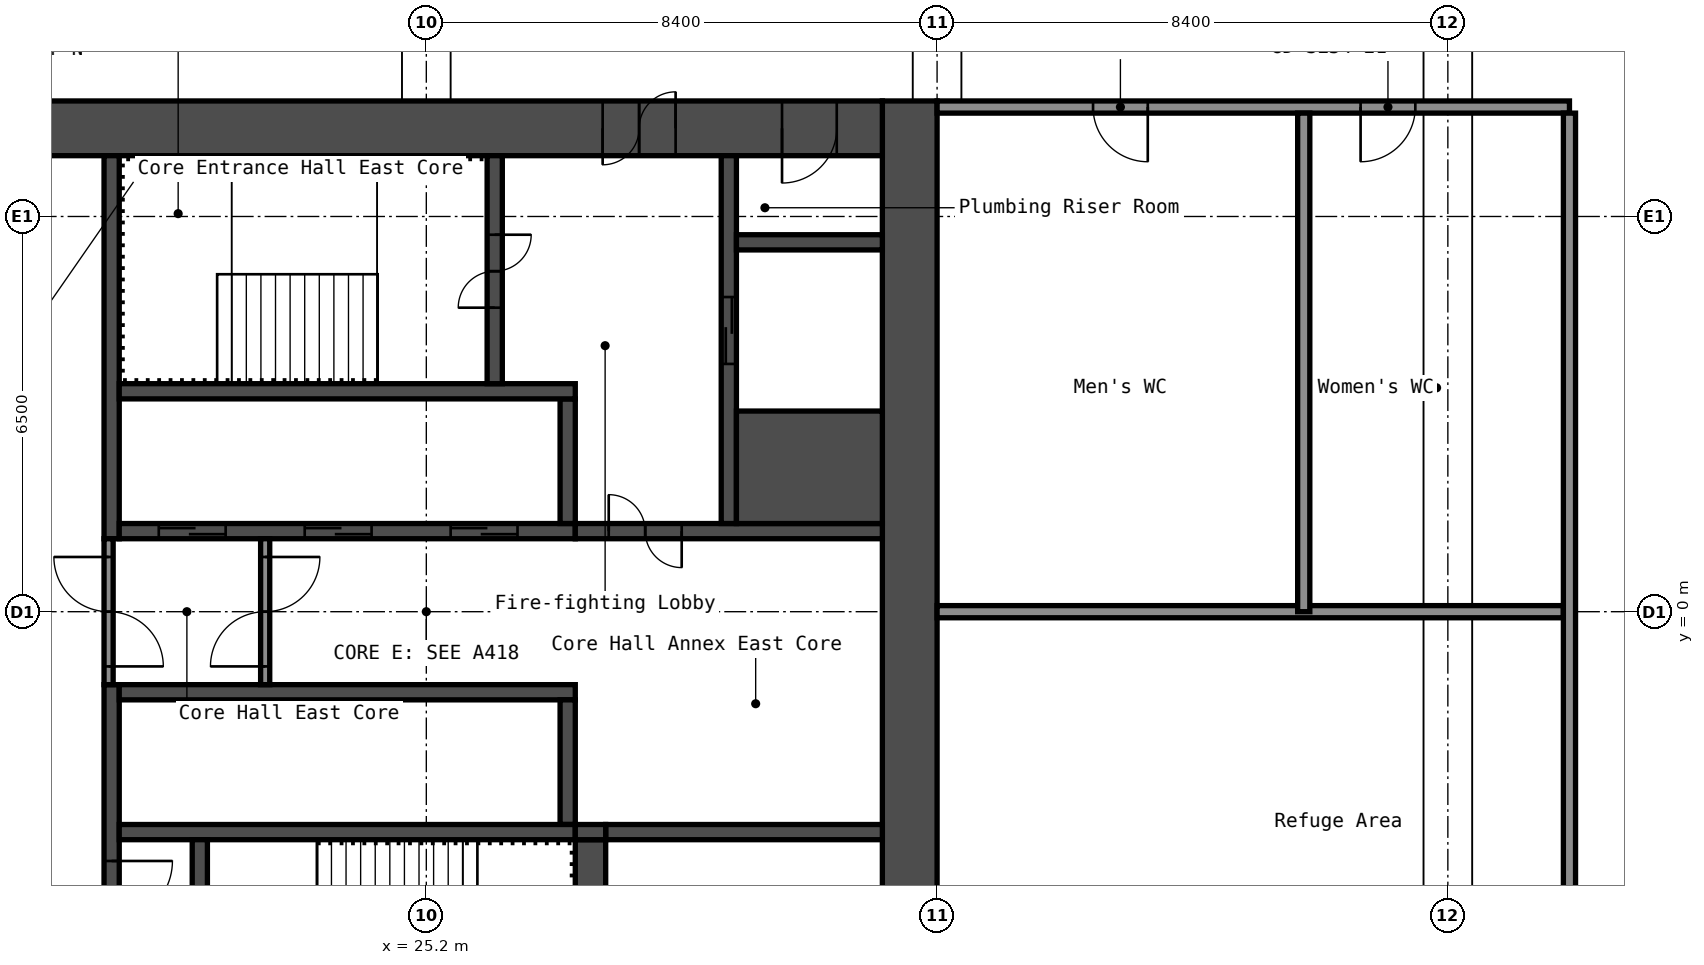
"""IFC4 building model, lengths in metres.
Left out: names, types, materials, properties, quantities, classifications, styles, units other than length and angle.
Written with IfcOpenShell. Run it as: python <this file> out.ifc"""

import sys

from ifc_helpers import new_model, si_unit, direction, frame, frame_2d, origin, place, context, subcontext, project, spatial, rectangle, extrude, element, fill, save


model = new_model("IFC4")
c1 = context("Model", 3, precision=1e-05, world=origin(), true_north=direction((0.0, 1.0)))
c2 = subcontext(c1, "Body", "Model", "MODEL_VIEW")
j1 = project(units=[si_unit("LENGTHUNIT", "METRE"), si_unit("PLANEANGLEUNIT", "RADIAN")], contexts=[c1])
p1 = place(None, origin())
s1 = spatial("IfcSite", under=j1, at=p1, CompositionType="ELEMENT")
p2 = place(p1, origin())
s2 = spatial("IfcBuilding", under=s1, at=p2, CompositionType="ELEMENT")
p3 = place(p2, frame((0.0, 0.0, 120.2)))
s3 = spatial("IfcBuildingStorey", under=s2, at=p3, CompositionType="ELEMENT", Elevation=120.2)
p4 = place(p3, frame((33.15, -8.4, 0.0), z_axis=(0.0, 0.0, 1.0), x_axis=(0.0, 1.0, 0.0)))
e1 = element("IfcWall", 1, at=p4, inside=s3, PredefinedType="SHEAR", context=c2, shape_type="SweptSolid", body=[
    extrude(rectangle(XDim=16.8, YDim=0.9, at=frame_2d((8.4, 0.0))), origin(), (0.0, 0.0, 1.0), 4.1),
])
p5 = place(p3, frame((17.7, 7.95, 0.0), z_axis=(0.0, 0.0, 1.0), x_axis=(1.0, 0.0, 0.0)))
e2 = element("IfcWall", 2, at=p5, inside=s3, PredefinedType="SHEAR", context=c2, shape_type="SweptSolid", body=[
    extrude(rectangle(XDim=15.0, YDim=0.9, at=frame_2d((7.5, 0.0))), origin(), (0.0, 0.0, 1.0), 4.1),
])
p6 = place(p5, frame((10.4, 0.0, 0.0)))
e3 = element("IfcOpeningElement", 3, at=p6, cuts=e2, PredefinedType="OPENING", context=c2, shape_type="SweptSolid", body=[
    extrude(rectangle(XDim=1.2, YDim=2.1, at=frame_2d((0.6, 1.05))), frame((0.0, 0.46, 0.0), z_axis=(0.0, -1.0, 0.0), x_axis=(1.0, 0.0, 0.0)), (0.0, 0.0, 1.0), 0.92),
])
p7 = place(p5, frame((13.35, 0.0, 0.0)))
e4 = element("IfcOpeningElement", 4, at=p7, cuts=e2, PredefinedType="OPENING", context=c2, shape_type="SweptSolid", body=[
    extrude(rectangle(XDim=0.9, YDim=2.1, at=frame_2d((0.45, 1.05))), frame((0.0, 0.46, 0.0), z_axis=(0.0, -1.0, 0.0), x_axis=(1.0, 0.0, 0.0)), (0.0, 0.0, 1.0), 0.92),
])
p8 = place(p3, frame((20.025, 1.2, 0.0), z_axis=(0.0, 0.0, 1.0), x_axis=(0.0, 1.0, 0.0)))
e5 = element("IfcWall", 5, at=p8, inside=s3, PredefinedType="SHEAR", context=c2, shape_type="SweptSolid", body=[
    extrude(rectangle(XDim=6.3, YDim=0.25, at=frame_2d((3.15, 0.0))), origin(), (0.0, 0.0, 1.0), 4.1),
])
p9 = place(p3, frame((20.025, -7.5, 0.0), z_axis=(0.0, 0.0, 1.0), x_axis=(0.0, 1.0, 0.0)))
e6 = element("IfcWall", 6, at=p9, inside=s3, PredefinedType="SHEAR", context=c2, shape_type="SweptSolid", body=[
    extrude(rectangle(XDim=6.3, YDim=0.25, at=frame_2d((3.15, 0.0))), origin(), (0.0, 0.0, 1.0), 4.1),
])
p10 = place(p9, frame((2.4, 0.0, 0.0)))
e7 = element("IfcOpeningElement", 7, at=p10, cuts=e6, PredefinedType="OPENING", context=c2, shape_type="SweptSolid", body=[
    extrude(rectangle(XDim=1.0, YDim=2.1, at=frame_2d((0.5, 1.05))), frame((0.0, 0.135, 0.0), z_axis=(0.0, -1.0, 0.0), x_axis=(1.0, 0.0, 0.0)), (0.0, 0.0, 1.0), 0.27),
])
p11 = place(p3, frame((20.15, 1.325, 0.0), z_axis=(0.0, 0.0, 1.0), x_axis=(1.0, 0.0, 0.0)))
e8 = element("IfcWall", 8, at=p11, inside=s3, PredefinedType="SHEAR", context=c2, shape_type="SweptSolid", body=[
    extrude(rectangle(XDim=7.5, YDim=0.25, at=frame_2d((3.75, 0.0))), origin(), (0.0, 0.0, 1.0), 4.1),
])
p12 = place(p11, frame((0.65, 0.0, 0.0)))
e9 = element("IfcOpeningElement", 9, at=p12, cuts=e8, PredefinedType="OPENING", context=c2, shape_type="SweptSolid", body=[
    extrude(rectangle(XDim=1.1, YDim=2.1, at=frame_2d((0.55, 1.05))), frame((0.0, 0.135, 0.0), z_axis=(0.0, -1.0, 0.0), x_axis=(1.0, 0.0, 0.0)), (0.0, 0.0, 1.0), 0.27),
])
p13 = place(p11, frame((3.05, 0.0, 0.0)))
e10 = element("IfcOpeningElement", 10, at=p13, cuts=e8, PredefinedType="OPENING", context=c2, shape_type="SweptSolid", body=[
    extrude(rectangle(XDim=1.1, YDim=2.1, at=frame_2d((0.55, 1.05))), frame((0.0, 0.135, 0.0), z_axis=(0.0, -1.0, 0.0), x_axis=(1.0, 0.0, 0.0)), (0.0, 0.0, 1.0), 0.27),
])
p14 = place(p11, frame((5.45, 0.0, 0.0)))
e11 = element("IfcOpeningElement", 11, at=p14, cuts=e8, PredefinedType="OPENING", context=c2, shape_type="SweptSolid", body=[
    extrude(rectangle(XDim=1.1, YDim=2.1, at=frame_2d((0.55, 1.05))), frame((0.0, 0.135, 0.0), z_axis=(0.0, -1.0, 0.0), x_axis=(1.0, 0.0, 0.0)), (0.0, 0.0, 1.0), 0.27),
])
p15 = place(p3, frame((27.525, 1.45, 0.0), z_axis=(0.0, 0.0, 1.0), x_axis=(0.0, 1.0, 0.0)))
e12 = element("IfcWall", 12, at=p15, inside=s3, PredefinedType="SHEAR", context=c2, shape_type="SweptSolid", body=[
    extrude(rectangle(XDim=2.05, YDim=0.25, at=frame_2d((1.025, 0.0))), origin(), (0.0, 0.0, 1.0), 4.1),
])
p16 = place(p3, frame((20.15, 3.625, 0.0), z_axis=(0.0, 0.0, 1.0), x_axis=(1.0, 0.0, 0.0)))
e13 = element("IfcWall", 13, at=p16, inside=s3, PredefinedType="SHEAR", context=c2, shape_type="SweptSolid", body=[
    extrude(rectangle(XDim=7.5, YDim=0.25, at=frame_2d((3.75, 0.0))), origin(), (0.0, 0.0, 1.0), 4.1),
])
p17 = place(p3, frame((26.325, 3.75, 0.0), z_axis=(0.0, 0.0, 1.0), x_axis=(0.0, 1.0, 0.0)))
e14 = element("IfcWall", 14, at=p17, inside=s3, PredefinedType="SHEAR", context=c2, shape_type="SweptSolid", body=[
    extrude(rectangle(XDim=3.75, YDim=0.25, at=frame_2d((1.875, 0.0))), origin(), (0.0, 0.0, 1.0), 4.1),
])
p18 = place(p17, frame((1.25, 0.0, 0.0)))
e15 = element("IfcOpeningElement", 15, at=p18, cuts=e14, PredefinedType="OPENING", context=c2, shape_type="SweptSolid", body=[
    extrude(rectangle(XDim=1.2, YDim=2.1, at=frame_2d((0.6, 1.05))), frame((0.0, 0.135, 0.0), z_axis=(0.0, -1.0, 0.0), x_axis=(1.0, 0.0, 0.0)), (0.0, 0.0, 1.0), 0.27),
])
p19 = place(p3, frame((27.65, 1.325, 0.0), z_axis=(0.0, 0.0, 1.0), x_axis=(1.0, 0.0, 0.0)))
e16 = element("IfcWall", 16, at=p19, inside=s3, PredefinedType="SHEAR", context=c2, shape_type="SweptSolid", body=[
    extrude(rectangle(XDim=5.05, YDim=0.25, at=frame_2d((2.525, 0.0))), origin(), (0.0, 0.0, 1.0), 4.1),
])
p20 = place(p19, frame((0.55, 0.0, 0.0)))
e17 = element("IfcOpeningElement", 17, at=p20, cuts=e16, PredefinedType="OPENING", context=c2, shape_type="SweptSolid", body=[
    extrude(rectangle(XDim=1.2, YDim=2.1, at=frame_2d((0.6, 1.05))), frame((0.0, 0.135, 0.0), z_axis=(0.0, -1.0, 0.0), x_axis=(1.0, 0.0, 0.0)), (0.0, 0.0, 1.0), 0.27),
])
p21 = place(p3, frame((30.175, 1.45, 0.0), z_axis=(0.0, 0.0, 1.0), x_axis=(0.0, 1.0, 0.0)))
e18 = element("IfcWall", 18, at=p21, inside=s3, PredefinedType="SHEAR", context=c2, shape_type="SweptSolid", body=[
    extrude(rectangle(XDim=6.05, YDim=0.25, at=frame_2d((3.025, 0.0))), origin(), (0.0, 0.0, 1.0), 4.1),
])
p22 = place(p21, frame((2.625, 0.0, 0.0)))
e19 = element("IfcOpeningElement", 19, at=p22, cuts=e18, PredefinedType="OPENING", context=c2, shape_type="SweptSolid", body=[
    extrude(rectangle(XDim=1.1, YDim=2.1, at=frame_2d((0.55, 1.05))), frame((0.0, 0.135, 0.0), z_axis=(0.0, -1.0, 0.0), x_axis=(1.0, 0.0, 0.0)), (0.0, 0.0, 1.0), 0.27),
])
p23 = place(p3, frame((30.3, 2.375, 0.0), z_axis=(0.0, 0.0, 1.0), x_axis=(1.0, 0.0, 0.0)))
e20 = element("IfcWall", 20, at=p23, inside=s3, PredefinedType="SHEAR", context=c2, shape_type="SweptSolid", body=[
    extrude(rectangle(XDim=2.4, YDim=1.85, at=frame_2d((1.2, 0.0))), origin(), (0.0, 0.0, 1.0), 4.1),
])
p24 = place(p3, frame((30.3, 6.075, 0.0), z_axis=(0.0, 0.0, 1.0), x_axis=(1.0, 0.0, 0.0)))
e21 = element("IfcWall", 21, at=p24, inside=s3, PredefinedType="SHEAR", context=c2, shape_type="SweptSolid", body=[
    extrude(rectangle(XDim=2.4, YDim=0.25, at=frame_2d((1.2, 0.0))), origin(), (0.0, 0.0, 1.0), 4.1),
])
p25 = place(p3, frame((20.15, -1.325, 0.0), z_axis=(0.0, 0.0, 1.0), x_axis=(1.0, 0.0, 0.0)))
e22 = element("IfcWall", 22, at=p25, inside=s3, PredefinedType="SHEAR", context=c2, shape_type="SweptSolid", body=[
    extrude(rectangle(XDim=7.5, YDim=0.25, at=frame_2d((3.75, 0.0))), origin(), (0.0, 0.0, 1.0), 4.1),
])
p26 = place(p3, frame((27.525, -3.5, 0.0), z_axis=(0.0, 0.0, 1.0), x_axis=(0.0, 1.0, 0.0)))
e23 = element("IfcWall", 23, at=p26, inside=s3, PredefinedType="SHEAR", context=c2, shape_type="SweptSolid", body=[
    extrude(rectangle(XDim=2.05, YDim=0.25, at=frame_2d((1.025, 0.0))), origin(), (0.0, 0.0, 1.0), 4.1),
])
p27 = place(p3, frame((20.15, -3.625, 0.0), z_axis=(0.0, 0.0, 1.0), x_axis=(1.0, 0.0, 0.0)))
e24 = element("IfcWall", 24, at=p27, inside=s3, PredefinedType="SHEAR", context=c2, shape_type="SweptSolid", body=[
    extrude(rectangle(XDim=7.5, YDim=0.25, at=frame_2d((3.75, 0.0))), origin(), (0.0, 0.0, 1.0), 4.1),
])
p28 = place(p3, frame((21.475, -7.5, 0.0), z_axis=(0.0, 0.0, 1.0), x_axis=(0.0, 1.0, 0.0)))
e25 = element("IfcWall", 25, at=p28, inside=s3, PredefinedType="SHEAR", context=c2, shape_type="SweptSolid", body=[
    extrude(rectangle(XDim=3.75, YDim=0.25, at=frame_2d((1.875, 0.0))), origin(), (0.0, 0.0, 1.0), 4.1),
])
p29 = place(p28, frame((1.3, 0.0, 0.0)))
e26 = element("IfcOpeningElement", 26, at=p29, cuts=e25, PredefinedType="OPENING", context=c2, shape_type="SweptSolid", body=[
    extrude(rectangle(XDim=1.2, YDim=2.1, at=frame_2d((0.6, 1.05))), frame((0.0, 0.135, 0.0), z_axis=(0.0, -1.0, 0.0), x_axis=(1.0, 0.0, 0.0)), (0.0, 0.0, 1.0), 0.27),
])
p30 = place(p3, frame((27.9, -7.5, 0.0), z_axis=(0.0, 0.0, 1.0), x_axis=(0.0, 1.0, 0.0)))
e27 = element("IfcWall", 27, at=p30, inside=s3, PredefinedType="SHEAR", context=c2, shape_type="SweptSolid", body=[
    extrude(rectangle(XDim=3.75, YDim=0.5, at=frame_2d((1.875, 0.0))), origin(), (0.0, 0.0, 1.0), 4.1),
])
p31 = place(p3, frame((28.15, -3.625, 0.0), z_axis=(0.0, 0.0, 1.0), x_axis=(1.0, 0.0, 0.0)))
e28 = element("IfcWall", 28, at=p31, inside=s3, PredefinedType="SHEAR", context=c2, shape_type="SweptSolid", body=[
    extrude(rectangle(XDim=4.55, YDim=0.25, at=frame_2d((2.275, 0.0))), origin(), (0.0, 0.0, 1.0), 4.1),
])
p32 = place(p3, frame((27.65, -3.625, 0.0), z_axis=(0.0, 0.0, 1.0), x_axis=(1.0, 0.0, 0.0)))
e29 = element("IfcWall", 29, at=p32, inside=s3, PredefinedType="SHEAR", context=c2, shape_type="SweptSolid", body=[
    extrude(rectangle(XDim=0.5, YDim=0.25, at=frame_2d((0.25, 0.0))), origin(), (0.0, 0.0, 1.0), 4.1),
])
p33 = place(p3, frame((19.975, -1.2, 0.0), z_axis=(0.0, 0.0, 1.0), x_axis=(0.0, 1.0, 0.0)))
e30 = element("IfcWall", 30, at=p33, inside=s3, PredefinedType="PARTITIONING", context=c2, shape_type="SweptSolid", body=[
    extrude(rectangle(XDim=2.4, YDim=0.15, at=frame_2d((1.2, 0.0))), origin(), (0.0, 0.0, 1.0), 4.1),
])
p34 = place(p33, frame((0.3, 0.0, 0.0)))
e31 = element("IfcOpeningElement", 31, at=p34, cuts=e30, PredefinedType="OPENING", context=c2, shape_type="SweptSolid", body=[
    extrude(rectangle(XDim=1.8, YDim=2.1, at=frame_2d((0.9, 1.05))), frame((0.0, 0.085, 0.0), z_axis=(0.0, -1.0, 0.0), x_axis=(1.0, 0.0, 0.0)), (0.0, 0.0, 1.0), 0.17),
])
p35 = place(p3, frame((22.55, -1.2, 0.0), z_axis=(0.0, 0.0, 1.0), x_axis=(0.0, 1.0, 0.0)))
e32 = element("IfcWall", 32, at=p35, inside=s3, PredefinedType="PARTITIONING", context=c2, shape_type="SweptSolid", body=[
    extrude(rectangle(XDim=2.4, YDim=0.15, at=frame_2d((1.2, 0.0))), origin(), (0.0, 0.0, 1.0), 4.1),
])
p36 = place(p35, frame((0.3, 0.0, 0.0)))
e33 = element("IfcOpeningElement", 33, at=p36, cuts=e32, PredefinedType="OPENING", context=c2, shape_type="SweptSolid", body=[
    extrude(rectangle(XDim=1.8, YDim=2.1, at=frame_2d((0.9, 1.05))), frame((0.0, 0.085, 0.0), z_axis=(0.0, -1.0, 0.0), x_axis=(1.0, 0.0, 0.0)), (0.0, 0.0, 1.0), 0.17),
])
p37 = place(p3, frame((33.6, 0.0, 0.0), z_axis=(0.0, 0.0, 1.0), x_axis=(1.0, 0.0, 0.0)))
e34 = element("IfcWall", 34, at=p37, inside=s3, PredefinedType="PARTITIONING", context=c2, shape_type="SweptSolid", body=[
    extrude(rectangle(XDim=10.3, YDim=0.2, at=frame_2d((5.15, 0.0))), origin(), (0.0, 0.0, 1.0), 4.1),
])
p38 = place(p3, frame((33.6, 8.3, 0.0), z_axis=(0.0, 0.0, 1.0), x_axis=(1.0, 0.0, 0.0)))
e35 = element("IfcWall", 35, at=p38, inside=s3, PredefinedType="PARTITIONING", context=c2, shape_type="SweptSolid", body=[
    extrude(rectangle(XDim=10.4, YDim=0.2, at=frame_2d((5.2, 0.0))), origin(), (0.0, 0.0, 1.0), 4.1),
])
p39 = place(p38, frame((2.565, 0.0, 0.0)))
e36 = element("IfcOpeningElement", 36, at=p39, cuts=e35, PredefinedType="OPENING", context=c2, shape_type="SweptSolid", body=[
    extrude(rectangle(XDim=0.9, YDim=2.1, at=frame_2d((0.45, 1.05))), frame((0.0, 0.11, 0.0), z_axis=(0.0, -1.0, 0.0), x_axis=(1.0, 0.0, 0.0)), (0.0, 0.0, 1.0), 0.22),
])
p40 = place(p38, frame((6.965, 0.0, 0.0)))
e37 = element("IfcOpeningElement", 37, at=p40, cuts=e35, PredefinedType="OPENING", context=c2, shape_type="SweptSolid", body=[
    extrude(rectangle(XDim=0.9, YDim=2.1, at=frame_2d((0.45, 1.05))), frame((0.0, 0.11, 0.0), z_axis=(0.0, -1.0, 0.0), x_axis=(1.0, 0.0, 0.0)), (0.0, 0.0, 1.0), 0.22),
])
p41 = place(p3, frame((39.63, 0.0, 0.0), z_axis=(0.0, 0.0, 1.0), x_axis=(0.0, 1.0, 0.0)))
e38 = element("IfcWall", 38, at=p41, inside=s3, PredefinedType="PARTITIONING", context=c2, shape_type="SweptSolid", body=[
    extrude(rectangle(XDim=8.2, YDim=0.2, at=frame_2d((4.1, 0.0))), origin(), (0.0, 0.0, 1.0), 4.1),
])
p42 = place(p3, frame((44.0, -8.2, 0.0), z_axis=(0.0, 0.0, 1.0), x_axis=(0.0, 1.0, 0.0)))
e39 = element("IfcWall", 39, at=p42, inside=s3, PredefinedType="PARTITIONING", context=c2, shape_type="SweptSolid", body=[
    extrude(rectangle(XDim=16.4, YDim=0.2, at=frame_2d((8.2, 0.0))), origin(), (0.0, 0.0, 1.0), 4.1),
])
p43 = place(p6, origin())
e40 = element("IfcDoor", 40, at=p43, inside=s3, OperationType="DOUBLE_DOOR_SINGLE_SWING", PredefinedType="DOOR", context=c2, shape_type="SweptSolid", body=[
    extrude(rectangle(XDim=1.2, YDim=2.1, at=frame_2d((0.6, 1.05))), frame((0.0, 0.025, 0.0), z_axis=(0.0, -1.0, 0.0), x_axis=(1.0, 0.0, 0.0)), (0.0, 0.0, 1.0), 0.05),
])
fill(e3, e40)
p44 = place(p7, origin())
e41 = element("IfcDoor", 41, at=p44, inside=s3, OperationType="SINGLE_SWING_LEFT", PredefinedType="DOOR", context=c2, shape_type="SweptSolid", body=[
    extrude(rectangle(XDim=0.9, YDim=2.1, at=frame_2d((0.45, 1.05))), frame((0.0, 0.025, 0.0), z_axis=(0.0, -1.0, 0.0), x_axis=(1.0, 0.0, 0.0)), (0.0, 0.0, 1.0), 0.05),
])
fill(e4, e41)
p45 = place(p18, origin())
e42 = element("IfcDoor", 42, at=p45, inside=s3, OperationType="DOUBLE_DOOR_SINGLE_SWING", PredefinedType="DOOR", context=c2, shape_type="SweptSolid", body=[
    extrude(rectangle(XDim=1.2, YDim=2.1, at=frame_2d((0.6, 1.05))), frame((0.0, 0.025, 0.0), z_axis=(0.0, -1.0, 0.0), x_axis=(1.0, 0.0, 0.0)), (0.0, 0.0, 1.0), 0.05),
])
fill(e15, e42)
p46 = place(p10, origin())
e43 = element("IfcDoor", 43, at=p46, inside=s3, OperationType="SINGLE_SWING_RIGHT", PredefinedType="DOOR", context=c2, shape_type="SweptSolid", body=[
    extrude(rectangle(XDim=1.0, YDim=2.1, at=frame_2d((0.5, 1.05))), frame((0.0, 0.025, 0.0), z_axis=(0.0, -1.0, 0.0), x_axis=(1.0, 0.0, 0.0)), (0.0, 0.0, 1.0), 0.05),
])
fill(e7, e43)
p47 = place(p20, origin())
e44 = element("IfcDoor", 44, at=p47, inside=s3, OperationType="DOUBLE_DOOR_SINGLE_SWING", PredefinedType="DOOR", context=c2, shape_type="SweptSolid", body=[
    extrude(rectangle(XDim=1.2, YDim=2.1, at=frame_2d((0.6, 1.05))), frame((0.0, 0.025, 0.0), z_axis=(0.0, -1.0, 0.0), x_axis=(1.0, 0.0, 0.0)), (0.0, 0.0, 1.0), 0.05),
])
fill(e17, e44)
p48 = place(p34, origin())
e45 = element("IfcDoor", 45, at=p48, inside=s3, OperationType="DOUBLE_DOOR_SINGLE_SWING", PredefinedType="DOOR", context=c2, shape_type="SweptSolid", body=[
    extrude(rectangle(XDim=1.8, YDim=2.1, at=frame_2d((0.9, 1.05))), frame((0.0, 0.025, 0.0), z_axis=(0.0, -1.0, 0.0), x_axis=(1.0, 0.0, 0.0)), (0.0, 0.0, 1.0), 0.05),
])
fill(e31, e45)
p49 = place(p36, origin())
e46 = element("IfcDoor", 46, at=p49, inside=s3, OperationType="DOUBLE_DOOR_SINGLE_SWING", PredefinedType="DOOR", context=c2, shape_type="SweptSolid", body=[
    extrude(rectangle(XDim=1.8, YDim=2.1, at=frame_2d((0.9, 1.05))), frame((0.0, 0.025, 0.0), z_axis=(0.0, -1.0, 0.0), x_axis=(1.0, 0.0, 0.0)), (0.0, 0.0, 1.0), 0.05),
])
fill(e33, e46)
p50 = place(p12, origin())
e47 = element("IfcDoor", 47, at=p50, inside=s3, OperationType="DOUBLE_DOOR_SLIDING", PredefinedType="DOOR", context=c2, shape_type="SweptSolid", body=[
    extrude(rectangle(XDim=1.1, YDim=2.1, at=frame_2d((0.55, 1.05))), frame((0.0, 0.025, 0.0), z_axis=(0.0, -1.0, 0.0), x_axis=(1.0, 0.0, 0.0)), (0.0, 0.0, 1.0), 0.05),
])
fill(e9, e47)
p51 = place(p13, origin())
e48 = element("IfcDoor", 48, at=p51, inside=s3, OperationType="DOUBLE_DOOR_SLIDING", PredefinedType="DOOR", context=c2, shape_type="SweptSolid", body=[
    extrude(rectangle(XDim=1.1, YDim=2.1, at=frame_2d((0.55, 1.05))), frame((0.0, 0.025, 0.0), z_axis=(0.0, -1.0, 0.0), x_axis=(1.0, 0.0, 0.0)), (0.0, 0.0, 1.0), 0.05),
])
fill(e10, e48)
p52 = place(p14, origin())
e49 = element("IfcDoor", 49, at=p52, inside=s3, OperationType="DOUBLE_DOOR_SLIDING", PredefinedType="DOOR", context=c2, shape_type="SweptSolid", body=[
    extrude(rectangle(XDim=1.1, YDim=2.1, at=frame_2d((0.55, 1.05))), frame((0.0, 0.025, 0.0), z_axis=(0.0, -1.0, 0.0), x_axis=(1.0, 0.0, 0.0)), (0.0, 0.0, 1.0), 0.05),
])
fill(e11, e49)
p53 = place(p22, origin())
e50 = element("IfcDoor", 50, at=p53, inside=s3, OperationType="DOUBLE_DOOR_SLIDING", PredefinedType="DOOR", context=c2, shape_type="SweptSolid", body=[
    extrude(rectangle(XDim=1.1, YDim=2.1, at=frame_2d((0.55, 1.05))), frame((0.0, 0.025, 0.0), z_axis=(0.0, -1.0, 0.0), x_axis=(1.0, 0.0, 0.0)), (0.0, 0.0, 1.0), 0.05),
])
fill(e19, e50)
p54 = place(p39, origin())
e51 = element("IfcDoor", 51, at=p54, inside=s3, OperationType="SINGLE_SWING_RIGHT", PredefinedType="DOOR", context=c2, shape_type="SweptSolid", body=[
    extrude(rectangle(XDim=0.9, YDim=2.1, at=frame_2d((0.45, 1.05))), frame((0.0, 0.025, 0.0), z_axis=(0.0, -1.0, 0.0), x_axis=(1.0, 0.0, 0.0)), (0.0, 0.0, 1.0), 0.05),
])
fill(e36, e51)
p55 = place(p40, origin())
e52 = element("IfcDoor", 52, at=p55, inside=s3, OperationType="SINGLE_SWING_LEFT", PredefinedType="DOOR", context=c2, shape_type="SweptSolid", body=[
    extrude(rectangle(XDim=0.9, YDim=2.1, at=frame_2d((0.45, 1.05))), frame((0.0, 0.025, 0.0), z_axis=(0.0, -1.0, 0.0), x_axis=(1.0, 0.0, 0.0)), (0.0, 0.0, 1.0), 0.05),
])
fill(e37, e52)
save(model, sys.argv[1])
